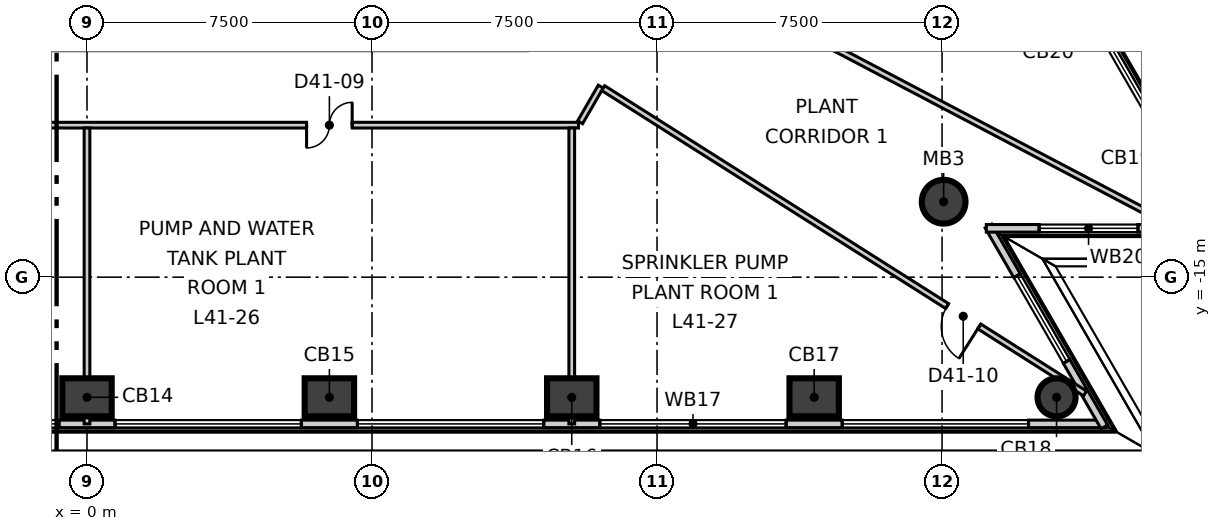
"""IFC4 building model, lengths in metres.
Left out: names, types, materials, properties, quantities, classifications, styles, units other than length and angle.
Written with IfcOpenShell. Run it as: python <this file> out.ifc"""

import sys

from ifc_helpers import new_model, si_unit, direction, frame, frame_2d, origin, origin_2d, place, context, subcontext, project, spatial, rectangle, circle, extrude, element, fill, save


model = new_model("IFC4")
c1 = context("Model", 3, precision=1e-05, world=origin(), true_north=direction((0.0, 1.0)))
c2 = subcontext(c1, "Body", "Model", "MODEL_VIEW")
j1 = project(units=[si_unit("LENGTHUNIT", "METRE"), si_unit("PLANEANGLEUNIT", "RADIAN")], contexts=[c1])
p1 = place(None, origin())
s1 = spatial("IfcSite", under=j1, at=p1, CompositionType="ELEMENT")
p2 = place(p1, origin())
s2 = spatial("IfcBuilding", under=s1, at=p2, CompositionType="ELEMENT")
p3 = place(p2, frame((0.0, 0.0, 176.3)))
s3 = spatial("IfcBuildingStorey", under=s2, at=p3, CompositionType="ELEMENT", Elevation=176.3)
for number, where, z_axis, x_axis in (
    (1, (0.0, -18.161, -0.3), (0.0, 0.0, 1.0), (1.0, 0.0, 0.0)),
    (2, (6.378, -18.161, -0.3), (0.0, 0.0, 1.0), (1.0, 0.0, 0.0)),
    (3, (12.756, -18.161, -0.3), (0.0, 0.0, 1.0), (1.0, 0.0, 0.0)),
    (4, (19.135, -18.161, -0.3), (0.0, 0.0, 1.0), (1.0, 0.0, 0.0)),
):
    element("IfcColumn", number, at=place(p3, frame(where, z_axis=z_axis, x_axis=x_axis)), inside=s3, PredefinedType="COLUMN", context=c2, shape_type="SweptSolid", body=[
        extrude(rectangle(XDim=1.3, YDim=1.0, at=origin_2d()), origin(), (0.0, 0.0, 1.0), 4.2),
    ])
p4 = place(p3, frame((25.513, -18.161, -0.3), z_axis=(0.0, 0.0, 1.0), x_axis=(1.0, 0.0, 0.0)))
e5 = element("IfcColumn", 5, at=p4, inside=s3, PredefinedType="COLUMN", context=c2, shape_type="SweptSolid", body=[
    extrude(circle(Radius=0.5, at=origin_2d()), origin(), (0.0, 0.0, 1.0), 4.2),
])
p5 = place(p3, frame((22.542, -13.015, -0.3), z_axis=(0.0, 0.0, 1.0), x_axis=(1.0, 0.0, 0.0)))
e6 = element("IfcColumn", 6, at=p5, inside=s3, PredefinedType="COLUMN", context=c2, shape_type="SweptSolid", body=[
    extrude(circle(Radius=0.575, at=origin_2d()), origin(), (0.0, 0.0, 1.0), 4.2),
])
p6 = place(p3, frame((-26.816, -18.861, 0.0), z_axis=(0.0, 0.0, 1.0), x_axis=(1.0, 0.0, 0.0)))
e7 = element("IfcWall", 7, at=p6, inside=s3, PredefinedType="ELEMENTEDWALL", context=c2, shape_type="SweptSolid", body=[
    extrude(rectangle(XDim=53.612, YDim=0.2, at=frame_2d((26.806, 0.0))), origin(), (0.0, 0.0, 1.0), 3.9),
])
p7 = place(p6, frame((2.042, 0.0, 0.9)))
e8 = element("IfcOpeningElement", 8, at=p7, cuts=e7, PredefinedType="OPENING", context=c2, shape_type="SweptSolid", body=[
    extrude(rectangle(XDim=4.9, YDim=2.5, at=frame_2d((2.45, 1.25))), frame((0.0, 0.11, 0.0), z_axis=(0.0, -1.0, 0.0), x_axis=(1.0, 0.0, 0.0)), (0.0, 0.0, 1.0), 0.22),
])
p8 = place(p6, frame((8.42, 0.0, 0.9)))
e9 = element("IfcOpeningElement", 9, at=p8, cuts=e7, PredefinedType="OPENING", context=c2, shape_type="SweptSolid", body=[
    extrude(rectangle(XDim=4.9, YDim=2.5, at=frame_2d((2.45, 1.25))), frame((0.0, 0.11, 0.0), z_axis=(0.0, -1.0, 0.0), x_axis=(1.0, 0.0, 0.0)), (0.0, 0.0, 1.0), 0.22),
])
p9 = place(p6, frame((14.799, 0.0, 0.9)))
e10 = element("IfcOpeningElement", 10, at=p9, cuts=e7, PredefinedType="OPENING", context=c2, shape_type="SweptSolid", body=[
    extrude(rectangle(XDim=4.9, YDim=2.5, at=frame_2d((2.45, 1.25))), frame((0.0, 0.11, 0.0), z_axis=(0.0, -1.0, 0.0), x_axis=(1.0, 0.0, 0.0)), (0.0, 0.0, 1.0), 0.22),
])
p10 = place(p6, frame((21.177, 0.0, 0.9)))
e11 = element("IfcOpeningElement", 11, at=p10, cuts=e7, PredefinedType="OPENING", context=c2, shape_type="SweptSolid", body=[
    extrude(rectangle(XDim=4.9, YDim=2.5, at=frame_2d((2.45, 1.25))), frame((0.0, 0.11, 0.0), z_axis=(0.0, -1.0, 0.0), x_axis=(1.0, 0.0, 0.0)), (0.0, 0.0, 1.0), 0.22),
])
p11 = place(p6, frame((27.555, 0.0, 0.9)))
e12 = element("IfcOpeningElement", 12, at=p11, cuts=e7, PredefinedType="OPENING", context=c2, shape_type="SweptSolid", body=[
    extrude(rectangle(XDim=4.9, YDim=2.5, at=frame_2d((2.45, 1.25))), frame((0.0, 0.11, 0.0), z_axis=(0.0, -1.0, 0.0), x_axis=(1.0, 0.0, 0.0)), (0.0, 0.0, 1.0), 0.22),
])
p12 = place(p6, frame((33.933, 0.0, 0.9)))
e13 = element("IfcOpeningElement", 13, at=p12, cuts=e7, PredefinedType="OPENING", context=c2, shape_type="SweptSolid", body=[
    extrude(rectangle(XDim=4.9, YDim=2.5, at=frame_2d((2.45, 1.25))), frame((0.0, 0.11, 0.0), z_axis=(0.0, -1.0, 0.0), x_axis=(1.0, 0.0, 0.0)), (0.0, 0.0, 1.0), 0.22),
])
p13 = place(p6, frame((40.312, 0.0, 0.9)))
e14 = element("IfcOpeningElement", 14, at=p13, cuts=e7, PredefinedType="OPENING", context=c2, shape_type="SweptSolid", body=[
    extrude(rectangle(XDim=4.9, YDim=2.5, at=frame_2d((2.45, 1.25))), frame((0.0, 0.11, 0.0), z_axis=(0.0, -1.0, 0.0), x_axis=(1.0, 0.0, 0.0)), (0.0, 0.0, 1.0), 0.22),
])
p14 = place(p6, frame((46.69, 0.0, 0.9)))
e15 = element("IfcOpeningElement", 15, at=p14, cuts=e7, PredefinedType="OPENING", context=c2, shape_type="SweptSolid", body=[
    extrude(rectangle(XDim=4.9, YDim=2.5, at=frame_2d((2.45, 1.25))), frame((0.0, 0.11, 0.0), z_axis=(0.0, -1.0, 0.0), x_axis=(1.0, 0.0, 0.0)), (0.0, 0.0, 1.0), 0.22),
])
p15 = place(p3, frame((26.771, -18.939, 0.0), z_axis=(0.0, 0.0, 1.0), x_axis=(-0.499972956414, 0.866041016843, 0.0)))
e16 = element("IfcWall", 16, at=p15, inside=s3, PredefinedType="ELEMENTEDWALL", context=c2, shape_type="SweptSolid", body=[
    extrude(rectangle(XDim=6.102, YDim=0.2, at=frame_2d((3.051, 0.0))), origin(), (0.0, 0.0, 1.0), 3.9),
])
p16 = place(p15, frame((1.99, 0.0, 0.9)))
e17 = element("IfcOpeningElement", 17, at=p16, cuts=e16, PredefinedType="OPENING", context=c2, shape_type="SweptSolid", body=[
    extrude(rectangle(XDim=2.6, YDim=2.5, at=frame_2d((1.3, 1.25))), frame((0.0, 0.11, 0.0), z_axis=(0.0, -1.0, 0.0), x_axis=(1.0, 0.0, 0.0)), (0.0, 0.0, 1.0), 0.22),
])
p17 = place(p3, frame((23.665, -13.715, 0.0), z_axis=(0.0, 0.0, 1.0), x_axis=(1.0, 0.0, 0.0)))
e18 = element("IfcWall", 18, at=p17, inside=s3, PredefinedType="ELEMENTEDWALL", context=c2, shape_type="SweptSolid", body=[
    extrude(rectangle(XDim=6.102, YDim=0.2, at=frame_2d((3.051, 0.0))), origin(), (0.0, 0.0, 1.0), 3.9),
])
p18 = place(p17, frame((1.39, 0.0, 0.9)))
e19 = element("IfcOpeningElement", 19, at=p18, cuts=e18, PredefinedType="OPENING", context=c2, shape_type="SweptSolid", body=[
    extrude(rectangle(XDim=2.6, YDim=2.5, at=frame_2d((1.3, 1.25))), frame((0.0, 0.11, 0.0), z_axis=(0.0, -1.0, 0.0), x_axis=(1.0, 0.0, 0.0)), (0.0, 0.0, 1.0), 0.22),
])
p19 = place(p3, frame((29.742, -13.793, 0.0), z_axis=(0.0, 0.0, 1.0), x_axis=(-0.499994049952, 0.866028839019, 0.0)))
e20 = element("IfcWall", 20, at=p19, inside=s3, PredefinedType="ELEMENTEDWALL", context=c2, shape_type="SweptSolid", body=[
    extrude(rectangle(XDim=53.613, YDim=0.2, at=frame_2d((26.806, 0.0))), origin(), (0.0, 0.0, 1.0), 3.9),
])
p20 = place(p19, frame((2.042, 0.0, 0.9)))
e21 = element("IfcOpeningElement", 21, at=p20, cuts=e20, PredefinedType="OPENING", context=c2, shape_type="SweptSolid", body=[
    extrude(rectangle(XDim=4.9, YDim=2.5, at=frame_2d((2.45, 1.25))), frame((0.0, 0.11, 0.0), z_axis=(0.0, -1.0, 0.0), x_axis=(1.0, 0.0, 0.0)), (0.0, 0.0, 1.0), 0.22),
])
p21 = place(p19, frame((8.42, 0.0, 0.9)))
e22 = element("IfcOpeningElement", 22, at=p21, cuts=e20, PredefinedType="OPENING", context=c2, shape_type="SweptSolid", body=[
    extrude(rectangle(XDim=4.9, YDim=2.5, at=frame_2d((2.45, 1.25))), frame((0.0, 0.11, 0.0), z_axis=(0.0, -1.0, 0.0), x_axis=(1.0, 0.0, 0.0)), (0.0, 0.0, 1.0), 0.22),
])
p22 = place(p19, frame((14.799, 0.0, 0.9)))
e23 = element("IfcOpeningElement", 23, at=p22, cuts=e20, PredefinedType="OPENING", context=c2, shape_type="SweptSolid", body=[
    extrude(rectangle(XDim=4.9, YDim=2.5, at=frame_2d((2.45, 1.25))), frame((0.0, 0.11, 0.0), z_axis=(0.0, -1.0, 0.0), x_axis=(1.0, 0.0, 0.0)), (0.0, 0.0, 1.0), 0.22),
])
p23 = place(p19, frame((21.177, 0.0, 0.9)))
e24 = element("IfcOpeningElement", 24, at=p23, cuts=e20, PredefinedType="OPENING", context=c2, shape_type="SweptSolid", body=[
    extrude(rectangle(XDim=4.9, YDim=2.5, at=frame_2d((2.45, 1.25))), frame((0.0, 0.11, 0.0), z_axis=(0.0, -1.0, 0.0), x_axis=(1.0, 0.0, 0.0)), (0.0, 0.0, 1.0), 0.22),
])
p24 = place(p19, frame((27.555, 0.0, 0.9)))
e25 = element("IfcOpeningElement", 25, at=p24, cuts=e20, PredefinedType="OPENING", context=c2, shape_type="SweptSolid", body=[
    extrude(rectangle(XDim=4.9, YDim=2.5, at=frame_2d((2.45, 1.25))), frame((0.0, 0.11, 0.0), z_axis=(0.0, -1.0, 0.0), x_axis=(1.0, 0.0, 0.0)), (0.0, 0.0, 1.0), 0.22),
])
p25 = place(p19, frame((33.934, 0.0, 0.9)))
e26 = element("IfcOpeningElement", 26, at=p25, cuts=e20, PredefinedType="OPENING", context=c2, shape_type="SweptSolid", body=[
    extrude(rectangle(XDim=4.9, YDim=2.5, at=frame_2d((2.45, 1.25))), frame((0.0, 0.11, 0.0), z_axis=(0.0, -1.0, 0.0), x_axis=(1.0, 0.0, 0.0)), (0.0, 0.0, 1.0), 0.22),
])
p26 = place(p19, frame((40.312, 0.0, 0.9)))
e27 = element("IfcOpeningElement", 27, at=p26, cuts=e20, PredefinedType="OPENING", context=c2, shape_type="SweptSolid", body=[
    extrude(rectangle(XDim=4.9, YDim=2.5, at=frame_2d((2.45, 1.25))), frame((0.0, 0.11, 0.0), z_axis=(0.0, -1.0, 0.0), x_axis=(1.0, 0.0, 0.0)), (0.0, 0.0, 1.0), 0.22),
])
p27 = place(p19, frame((46.691, 0.0, 0.9)))
e28 = element("IfcOpeningElement", 28, at=p27, cuts=e20, PredefinedType="OPENING", context=c2, shape_type="SweptSolid", body=[
    extrude(rectangle(XDim=4.9, YDim=2.5, at=frame_2d((2.45, 1.25))), frame((0.0, 0.11, 0.0), z_axis=(0.0, -1.0, 0.0), x_axis=(1.0, 0.0, 0.0)), (0.0, 0.0, 1.0), 0.22),
])
p28 = place(p3, frame((-12.846, -11.0, 0.0), z_axis=(0.0, 0.0, 1.0), x_axis=(1.0, 0.0, 0.0)))
e29 = element("IfcWall", 29, at=p28, inside=s3, PredefinedType="PARTITIONING", context=c2, shape_type="SweptSolid", body=[
    extrude(rectangle(XDim=25.779, YDim=0.15, at=frame_2d((12.89, 0.0))), origin(), (0.0, 0.0, 1.0), 3.9),
])
p29 = place(p28, frame((5.868, 0.0, 0.0)))
e30 = element("IfcOpeningElement", 30, at=p29, cuts=e29, PredefinedType="OPENING", context=c2, shape_type="SweptSolid", body=[
    extrude(rectangle(XDim=1.2, YDim=2.1, at=frame_2d((0.6, 1.05))), frame((0.0, 0.085, 0.0), z_axis=(0.0, -1.0, 0.0), x_axis=(1.0, 0.0, 0.0)), (0.0, 0.0, 1.0), 0.17),
])
p30 = place(p28, frame((18.624, 0.0, 0.0)))
e31 = element("IfcOpeningElement", 31, at=p30, cuts=e29, PredefinedType="OPENING", context=c2, shape_type="SweptSolid", body=[
    extrude(rectangle(XDim=1.2, YDim=2.1, at=frame_2d((0.6, 1.05))), frame((0.0, 0.085, 0.0), z_axis=(0.0, -1.0, 0.0), x_axis=(1.0, 0.0, 0.0)), (0.0, 0.0, 1.0), 0.17),
])
p31 = place(p3, frame((0.0, -18.861, 0.0), z_axis=(0.0, 0.0, 1.0), x_axis=(0.0, 1.0, 0.0)))
e32 = element("IfcWall", 32, at=p31, inside=s3, PredefinedType="PARTITIONING", context=c2, shape_type="SweptSolid", body=[
    extrude(rectangle(XDim=7.786, YDim=0.15, at=frame_2d((3.893, 0.0))), origin(), (0.0, 0.0, 1.0), 3.4),
])
p32 = place(p3, frame((15.398, -6.73, 0.0), z_axis=(0.0, 0.0, 1.0), x_axis=(0.885369312883, -0.464888351978, 0.0)))
e33 = element("IfcWall", 33, at=p32, inside=s3, PredefinedType="PARTITIONING", context=c2, shape_type="SweptSolid", body=[
    extrude(rectangle(XDim=15.025, YDim=0.15, at=frame_2d((7.513, 0.0))), origin(), (0.0, 0.0, 1.0), 3.2),
])
p33 = place(p3, frame((12.976, -10.925, 0.0), z_axis=(0.0, 0.0, 1.0), x_axis=(0.500202653336, 0.865908370208, 0.0)))
e34 = element("IfcWall", 34, at=p33, inside=s3, PredefinedType="PARTITIONING", context=c2, shape_type="SweptSolid", body=[
    extrude(rectangle(XDim=1.085, YDim=0.15, at=frame_2d((0.543, 0.0))), origin(), (0.0, 0.0, 1.0), 3.9),
])
p34 = place(p3, frame((12.756, -18.861, 0.0), z_axis=(0.0, 0.0, 1.0), x_axis=(0.0, 1.0, 0.0)))
e35 = element("IfcWall", 35, at=p34, inside=s3, PredefinedType="PARTITIONING", context=c2, shape_type="SweptSolid", body=[
    extrude(rectangle(XDim=7.786, YDim=0.15, at=frame_2d((3.893, 0.0))), origin(), (0.0, 0.0, 1.0), 3.9),
])
p35 = place(p3, frame((13.582, -10.025, 0.0), z_axis=(0.0, 0.0, 1.0), x_axis=(0.844701192356, -0.535238167205, 0.0)))
e36 = element("IfcWall", 36, at=p35, inside=s3, PredefinedType="PARTITIONING", context=c2, shape_type="SweptSolid", body=[
    extrude(rectangle(XDim=15.012, YDim=0.15, at=frame_2d((7.506, 0.0))), origin(), (0.0, 0.0, 1.0), 3.2),
])
p36 = place(p35, frame((10.717, 0.0, 0.0)))
e37 = element("IfcOpeningElement", 37, at=p36, cuts=e36, PredefinedType="OPENING", context=c2, shape_type="SweptSolid", body=[
    extrude(rectangle(XDim=1.0, YDim=2.1, at=frame_2d((0.5, 1.05))), frame((0.0, 0.085, 0.0), z_axis=(0.0, -1.0, 0.0), x_axis=(1.0, 0.0, 0.0)), (0.0, 0.0, 1.0), 0.17),
])
p37 = place(p10, origin())
e38 = element("IfcWindow", 38, at=p37, inside=s3, PartitioningType="SINGLE_PANEL", PredefinedType="WINDOW", context=c2, shape_type="SweptSolid", body=[
    extrude(rectangle(XDim=4.9, YDim=2.5, at=frame_2d((2.45, 1.25))), frame((0.0, 0.03, 0.0), z_axis=(0.0, -1.0, 0.0), x_axis=(1.0, 0.0, 0.0)), (0.0, 0.0, 1.0), 0.06),
])
fill(e11, e38)
p38 = place(p11, origin())
e39 = element("IfcWindow", 39, at=p38, inside=s3, PartitioningType="SINGLE_PANEL", PredefinedType="WINDOW", context=c2, shape_type="SweptSolid", body=[
    extrude(rectangle(XDim=4.9, YDim=2.5, at=frame_2d((2.45, 1.25))), frame((0.0, 0.03, 0.0), z_axis=(0.0, -1.0, 0.0), x_axis=(1.0, 0.0, 0.0)), (0.0, 0.0, 1.0), 0.06),
])
fill(e12, e39)
p39 = place(p12, origin())
e40 = element("IfcWindow", 40, at=p39, inside=s3, PartitioningType="SINGLE_PANEL", PredefinedType="WINDOW", context=c2, shape_type="SweptSolid", body=[
    extrude(rectangle(XDim=4.9, YDim=2.5, at=frame_2d((2.45, 1.25))), frame((0.0, 0.03, 0.0), z_axis=(0.0, -1.0, 0.0), x_axis=(1.0, 0.0, 0.0)), (0.0, 0.0, 1.0), 0.06),
])
fill(e13, e40)
p40 = place(p13, origin())
e41 = element("IfcWindow", 41, at=p40, inside=s3, PartitioningType="SINGLE_PANEL", PredefinedType="WINDOW", context=c2, shape_type="SweptSolid", body=[
    extrude(rectangle(XDim=4.9, YDim=2.5, at=frame_2d((2.45, 1.25))), frame((0.0, 0.03, 0.0), z_axis=(0.0, -1.0, 0.0), x_axis=(1.0, 0.0, 0.0)), (0.0, 0.0, 1.0), 0.06),
])
fill(e14, e41)
p41 = place(p14, origin())
e42 = element("IfcWindow", 42, at=p41, inside=s3, PartitioningType="SINGLE_PANEL", PredefinedType="WINDOW", context=c2, shape_type="SweptSolid", body=[
    extrude(rectangle(XDim=4.9, YDim=2.5, at=frame_2d((2.45, 1.25))), frame((0.0, 0.03, 0.0), z_axis=(0.0, -1.0, 0.0), x_axis=(1.0, 0.0, 0.0)), (0.0, 0.0, 1.0), 0.06),
])
fill(e15, e42)
p42 = place(p16, origin())
e43 = element("IfcWindow", 43, at=p42, inside=s3, PartitioningType="SINGLE_PANEL", PredefinedType="WINDOW", context=c2, shape_type="SweptSolid", body=[
    extrude(rectangle(XDim=2.6, YDim=2.5, at=frame_2d((1.3, 1.25))), frame((0.0, 0.03, 0.0), z_axis=(0.0, -1.0, 0.0), x_axis=(1.0, 0.0, 0.0)), (0.0, 0.0, 1.0), 0.06),
])
fill(e17, e43)
p43 = place(p18, origin())
e44 = element("IfcWindow", 44, at=p43, inside=s3, PartitioningType="SINGLE_PANEL", PredefinedType="WINDOW", context=c2, shape_type="SweptSolid", body=[
    extrude(rectangle(XDim=2.6, YDim=2.5, at=frame_2d((1.3, 1.25))), frame((0.0, 0.03, 0.0), z_axis=(0.0, -1.0, 0.0), x_axis=(1.0, 0.0, 0.0)), (0.0, 0.0, 1.0), 0.06),
])
fill(e19, e44)
p44 = place(p20, origin())
e45 = element("IfcWindow", 45, at=p44, inside=s3, PartitioningType="SINGLE_PANEL", PredefinedType="WINDOW", context=c2, shape_type="SweptSolid", body=[
    extrude(rectangle(XDim=4.9, YDim=2.5, at=frame_2d((2.45, 1.25))), frame((0.0, 0.03, 0.0), z_axis=(0.0, -1.0, 0.0), x_axis=(1.0, 0.0, 0.0)), (0.0, 0.0, 1.0), 0.06),
])
fill(e21, e45)
p45 = place(p30, origin())
e46 = element("IfcDoor", 46, at=p45, inside=s3, OperationType="DOUBLE_DOOR_SINGLE_SWING", PredefinedType="DOOR", context=c2, shape_type="SweptSolid", body=[
    extrude(rectangle(XDim=1.2, YDim=2.1, at=frame_2d((0.6, 1.05))), frame((0.0, 0.025, 0.0), z_axis=(0.0, -1.0, 0.0), x_axis=(1.0, 0.0, 0.0)), (0.0, 0.0, 1.0), 0.05),
])
fill(e31, e46)
p46 = place(p36, origin())
e47 = element("IfcDoor", 47, at=p46, inside=s3, OperationType="SINGLE_SWING_RIGHT", PredefinedType="DOOR", context=c2, shape_type="SweptSolid", body=[
    extrude(rectangle(XDim=1.0, YDim=2.1, at=frame_2d((0.5, 1.05))), frame((0.0, 0.025, 0.0), z_axis=(0.0, -1.0, 0.0), x_axis=(1.0, 0.0, 0.0)), (0.0, 0.0, 1.0), 0.05),
])
fill(e37, e47)
save(model, sys.argv[1])
